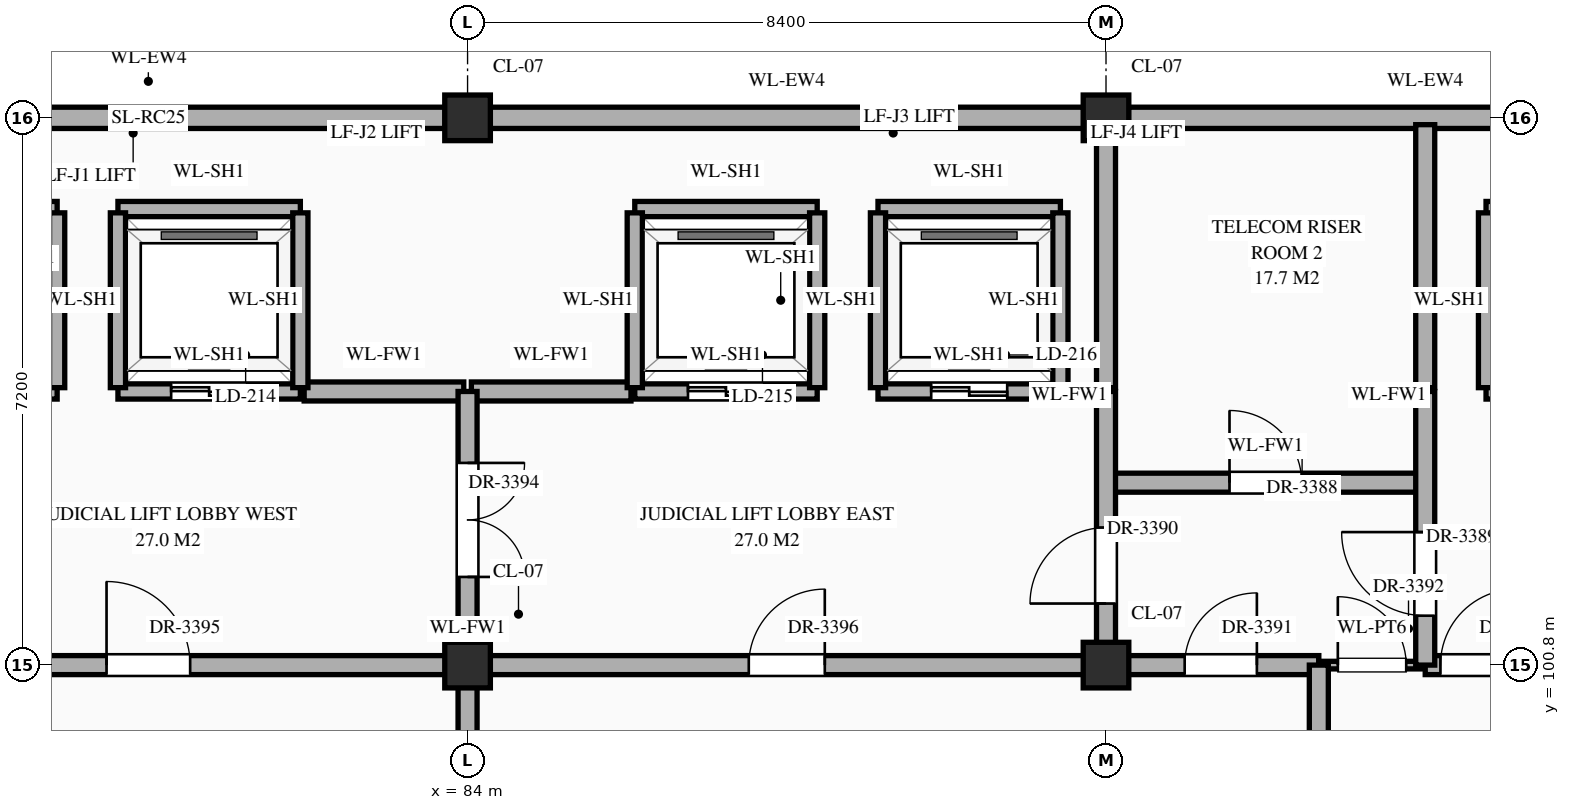
"""IFC4 building model, lengths in metres.
Left out: names, types, materials, properties, quantities, classifications, styles, units other than length and angle.
Written with IfcOpenShell. Run it as: python <this file> out.ifc"""

import sys

from ifc_helpers import new_model, si_unit, direction, frame, frame_2d, origin, origin_2d, place, context, subcontext, project, spatial, rectangle, extrude, element, fill, save


model = new_model("IFC4")
c1 = context("Model", 3, precision=1e-05, world=origin(), true_north=direction((0.0, 1.0)))
c2 = subcontext(c1, "Body", "Model", "MODEL_VIEW")
j1 = project(units=[si_unit("LENGTHUNIT", "METRE"), si_unit("PLANEANGLEUNIT", "RADIAN")], contexts=[c1])
p1 = place(None, origin())
s1 = spatial("IfcSite", under=j1, at=p1, CompositionType="ELEMENT")
p2 = place(p1, origin())
s2 = spatial("IfcBuilding", under=s1, at=p2, CompositionType="ELEMENT")
p3 = place(p2, frame((0.0, 0.0, 68.7)))
s3 = spatial("IfcBuildingStorey", under=s2, at=p3, CompositionType="ELEMENT", Elevation=68.7)
for number, where, z_axis, x_axis in (
    (1, (84.0, 100.8, 0.0), (0.0, 0.0, 1.0), (1.0, 0.0, 0.0)),
    (2, (84.0, 108.0, 0.0), (0.0, 0.0, 1.0), (1.0, 0.0, 0.0)),
    (3, (92.4, 100.8, 0.0), (0.0, 0.0, 1.0), (1.0, 0.0, 0.0)),
    (4, (92.4, 108.0, 0.0), (0.0, 0.0, 1.0), (1.0, 0.0, 0.0)),
):
    element("IfcColumn", number, at=place(p3, frame(where, z_axis=z_axis, x_axis=x_axis)), inside=s3, PredefinedType="COLUMN", context=c2, shape_type="SweptSolid", body=[
        extrude(rectangle(XDim=0.6, YDim=0.6, at=origin_2d()), origin(), (0.0, 0.0, 1.0), 4.5),
    ])
for number, where, z_axis, x_axis in (
    (5, (75.895, 108.0, 0.0), (0.0, 0.0, 1.0), (1.0, 0.0, 0.0)),
    (6, (84.295, 108.0, 0.0), (0.0, 0.0, 1.0), (1.0, 0.0, 0.0)),
):
    element("IfcWall", number, at=place(p3, frame(where, z_axis=z_axis, x_axis=x_axis)), inside=s3, PredefinedType="STANDARD", context=c2, shape_type="SweptSolid", body=[
        extrude(rectangle(XDim=7.81, YDim=0.28, at=frame_2d((3.905, 0.0))), origin(), (0.0, 0.0, 1.0), 3.47),
    ])
p4 = place(p3, frame((92.695, 108.0, 0.0), z_axis=(0.0, 0.0, 1.0), x_axis=(1.0, 0.0, 0.0)))
e7 = element("IfcWall", 7, at=p4, inside=s3, PredefinedType="STANDARD", context=c2, shape_type="SweptSolid", body=[
    extrude(rectangle(XDim=7.81, YDim=0.28, at=frame_2d((3.905, 0.0))), origin(), (0.0, 0.0, 1.0), 3.47),
])
p5 = place(p3, frame((72.8, 100.8, 0.0), z_axis=(0.0, 0.0, 1.0), x_axis=(1.0, 0.0, 0.0)))
e8 = element("IfcWall", 8, at=p5, inside=s3, PredefinedType="STANDARD", context=c2, shape_type="SweptSolid", body=[
    extrude(rectangle(XDim=22.4, YDim=0.25, at=frame_2d((11.2, 0.0))), origin(), (0.0, 0.0, 1.0), 3.27),
])
p6 = place(p5, frame((0.79, 0.0, 0.0)))
e9 = element("IfcOpeningElement", 9, at=p6, cuts=e8, PredefinedType="OPENING", context=c2, shape_type="SweptSolid", body=[
    extrude(rectangle(XDim=1.0, YDim=2.2, at=frame_2d((0.5, 1.1))), frame((0.0, 0.137, 0.0), z_axis=(0.0, -1.0, 0.0), x_axis=(1.0, 0.0, 0.0)), (0.0, 0.0, 1.0), 0.274),
])
p7 = place(p5, frame((20.635, 0.0, 0.0)))
e10 = element("IfcOpeningElement", 10, at=p7, cuts=e8, PredefinedType="OPENING", context=c2, shape_type="SweptSolid", body=[
    extrude(rectangle(XDim=0.95, YDim=2.15, at=frame_2d((0.475, 1.075))), frame((0.0, 0.137, 0.0), z_axis=(0.0, -1.0, 0.0), x_axis=(1.0, 0.0, 0.0)), (0.0, 0.0, 1.0), 0.274),
])
p8 = place(p5, frame((6.45, 0.0, 0.0)))
e11 = element("IfcOpeningElement", 11, at=p8, cuts=e8, PredefinedType="OPENING", context=c2, shape_type="SweptSolid", body=[
    extrude(rectangle(XDim=1.1, YDim=2.2, at=frame_2d((0.55, 1.1))), frame((0.0, 0.137, 0.0), z_axis=(0.0, -1.0, 0.0), x_axis=(1.0, 0.0, 0.0)), (0.0, 0.0, 1.0), 0.274),
])
p9 = place(p5, frame((14.9, 0.0, 0.0)))
e12 = element("IfcOpeningElement", 12, at=p9, cuts=e8, PredefinedType="OPENING", context=c2, shape_type="SweptSolid", body=[
    extrude(rectangle(XDim=1.0, YDim=2.2, at=frame_2d((0.5, 1.1))), frame((0.0, 0.137, 0.0), z_axis=(0.0, -1.0, 0.0), x_axis=(1.0, 0.0, 0.0)), (0.0, 0.0, 1.0), 0.274),
])
p10 = place(p3, frame((95.2, 100.8, 0.0), z_axis=(0.0, 0.0, 1.0), x_axis=(1.0, 0.0, 0.0)))
e13 = element("IfcWall", 13, at=p10, inside=s3, PredefinedType="STANDARD", context=c2, shape_type="SweptSolid", body=[
    extrude(rectangle(XDim=1.4, YDim=0.1, at=frame_2d((0.7, 0.0))), origin(), (0.0, 0.0, 1.0), 3.27),
])
p11 = place(p10, frame((0.25, 0.0, 0.0)))
e14 = element("IfcOpeningElement", 14, at=p11, cuts=e13, PredefinedType="OPENING", context=c2, shape_type="SweptSolid", body=[
    extrude(rectangle(XDim=0.9, YDim=2.15, at=frame_2d((0.45, 1.075))), frame((0.0, 0.062, 0.0), z_axis=(0.0, -1.0, 0.0), x_axis=(1.0, 0.0, 0.0)), (0.0, 0.0, 1.0), 0.124),
])
p12 = place(p3, frame((96.6, 100.8, 0.0), z_axis=(0.0, 0.0, 1.0), x_axis=(1.0, 0.0, 0.0)))
e15 = element("IfcWall", 15, at=p12, inside=s3, PredefinedType="STANDARD", context=c2, shape_type="SweptSolid", body=[
    extrude(rectangle(XDim=12.56, YDim=0.25, at=frame_2d((6.28, 0.0))), origin(), (0.0, 0.0, 1.0), 3.27),
])
p13 = place(p12, frame((7.85, 0.0, 0.0)))
e16 = element("IfcOpeningElement", 16, at=p13, cuts=e15, PredefinedType="OPENING", context=c2, shape_type="SweptSolid", body=[
    extrude(rectangle(XDim=1.1, YDim=2.2, at=frame_2d((0.55, 1.1))), frame((0.0, 0.137, 0.0), z_axis=(0.0, -1.0, 0.0), x_axis=(1.0, 0.0, 0.0)), (0.0, 0.0, 1.0), 0.274),
])
p14 = place(p12, frame((0.2, 0.0, 0.0)))
e17 = element("IfcOpeningElement", 17, at=p14, cuts=e15, PredefinedType="OPENING", context=c2, shape_type="SweptSolid", body=[
    extrude(rectangle(XDim=1.0, YDim=2.2, at=frame_2d((0.5, 1.1))), frame((0.0, 0.137, 0.0), z_axis=(0.0, -1.0, 0.0), x_axis=(1.0, 0.0, 0.0)), (0.0, 0.0, 1.0), 0.274),
])
p15 = place(p3, frame((92.4, 103.2, 0.0), z_axis=(0.0, 0.0, 1.0), x_axis=(1.0, 0.0, 0.0)))
e18 = element("IfcWall", 18, at=p15, inside=s3, PredefinedType="STANDARD", context=c2, shape_type="SweptSolid", body=[
    extrude(rectangle(XDim=4.2, YDim=0.25, at=frame_2d((2.1, 0.0))), origin(), (0.0, 0.0, 1.0), 4.12),
])
p16 = place(p15, frame((1.625, 0.0, 0.0)))
e19 = element("IfcOpeningElement", 19, at=p16, cuts=e18, PredefinedType="OPENING", context=c2, shape_type="SweptSolid", body=[
    extrude(rectangle(XDim=0.95, YDim=2.15, at=frame_2d((0.475, 1.075))), frame((0.0, 0.137, 0.0), z_axis=(0.0, -1.0, 0.0), x_axis=(1.0, 0.0, 0.0)), (0.0, 0.0, 1.0), 0.274),
])
p17 = place(p3, frame((76.2, 104.4, 0.0), z_axis=(0.0, 0.0, 1.0), x_axis=(1.0, 0.0, 0.0)))
e20 = element("IfcWall", 20, at=p17, inside=s3, PredefinedType="STANDARD", context=c2, shape_type="SweptSolid", body=[
    extrude(rectangle(XDim=2.4, YDim=0.2, at=frame_2d((1.2, 0.0))), origin(), (0.0, 0.0, 1.0), 4.12),
])
p18 = place(p17, frame((0.7, 0.0, 0.0)))
e21 = element("IfcOpeningElement", 21, at=p18, cuts=e20, PredefinedType="OPENING", context=c2, shape_type="SweptSolid", body=[
    extrude(rectangle(XDim=1.0, YDim=2.15, at=frame_2d((0.5, 1.075))), frame((0.0, 0.112, 0.0), z_axis=(0.0, -1.0, 0.0), x_axis=(1.0, 0.0, 0.0)), (0.0, 0.0, 1.0), 0.224),
])
p19 = place(p3, frame((79.4, 104.4, 0.0), z_axis=(0.0, 0.0, 1.0), x_axis=(1.0, 0.0, 0.0)))
e22 = element("IfcWall", 22, at=p19, inside=s3, PredefinedType="STANDARD", context=c2, shape_type="SweptSolid", body=[
    extrude(rectangle(XDim=2.4, YDim=0.2, at=frame_2d((1.2, 0.0))), origin(), (0.0, 0.0, 1.0), 4.12),
])
p20 = place(p19, frame((0.7, 0.0, 0.0)))
e23 = element("IfcOpeningElement", 23, at=p20, cuts=e22, PredefinedType="OPENING", context=c2, shape_type="SweptSolid", body=[
    extrude(rectangle(XDim=1.0, YDim=2.15, at=frame_2d((0.5, 1.075))), frame((0.0, 0.112, 0.0), z_axis=(0.0, -1.0, 0.0), x_axis=(1.0, 0.0, 0.0)), (0.0, 0.0, 1.0), 0.224),
])
for number, where, z_axis, x_axis in (
    (24, (81.85, 104.4, 0.0), (0.0, 0.0, 1.0), (1.0, 0.0, 0.0)),
    (25, (84.05, 104.4, 0.0), (0.0, 0.0, 1.0), (1.0, 0.0, 0.0)),
):
    element("IfcWall", number, at=place(p3, frame(where, z_axis=z_axis, x_axis=x_axis)), inside=s3, PredefinedType="STANDARD", context=c2, shape_type="SweptSolid", body=[
        extrude(rectangle(XDim=2.1, YDim=0.25, at=frame_2d((1.05, 0.0))), origin(), (0.0, 0.0, 1.0), 4.12),
    ])
p21 = place(p3, frame((86.2, 104.4, 0.0), z_axis=(0.0, 0.0, 1.0), x_axis=(1.0, 0.0, 0.0)))
e26 = element("IfcWall", 26, at=p21, inside=s3, PredefinedType="STANDARD", context=c2, shape_type="SweptSolid", body=[
    extrude(rectangle(XDim=2.4, YDim=0.2, at=frame_2d((1.2, 0.0))), origin(), (0.0, 0.0, 1.0), 4.12),
])
p22 = place(p21, frame((0.7, 0.0, 0.0)))
e27 = element("IfcOpeningElement", 27, at=p22, cuts=e26, PredefinedType="OPENING", context=c2, shape_type="SweptSolid", body=[
    extrude(rectangle(XDim=1.0, YDim=2.15, at=frame_2d((0.5, 1.075))), frame((0.0, 0.112, 0.0), z_axis=(0.0, -1.0, 0.0), x_axis=(1.0, 0.0, 0.0)), (0.0, 0.0, 1.0), 0.224),
])
p23 = place(p3, frame((89.4, 104.4, 0.0), z_axis=(0.0, 0.0, 1.0), x_axis=(1.0, 0.0, 0.0)))
e28 = element("IfcWall", 28, at=p23, inside=s3, PredefinedType="STANDARD", context=c2, shape_type="SweptSolid", body=[
    extrude(rectangle(XDim=2.4, YDim=0.2, at=frame_2d((1.2, 0.0))), origin(), (0.0, 0.0, 1.0), 4.12),
])
p24 = place(p23, frame((0.7, 0.0, 0.0)))
e29 = element("IfcOpeningElement", 29, at=p24, cuts=e28, PredefinedType="OPENING", context=c2, shape_type="SweptSolid", body=[
    extrude(rectangle(XDim=1.0, YDim=2.15, at=frame_2d((0.5, 1.075))), frame((0.0, 0.112, 0.0), z_axis=(0.0, -1.0, 0.0), x_axis=(1.0, 0.0, 0.0)), (0.0, 0.0, 1.0), 0.224),
])
p25 = place(p3, frame((97.4, 104.4, 0.0), z_axis=(0.0, 0.0, 1.0), x_axis=(1.0, 0.0, 0.0)))
e30 = element("IfcWall", 30, at=p25, inside=s3, PredefinedType="STANDARD", context=c2, shape_type="SweptSolid", body=[
    extrude(rectangle(XDim=3.0, YDim=0.2, at=frame_2d((1.5, 0.0))), origin(), (0.0, 0.0, 1.0), 4.12),
])
p26 = place(p25, frame((0.9, 0.0, 0.0)))
e31 = element("IfcOpeningElement", 31, at=p26, cuts=e30, PredefinedType="OPENING", context=c2, shape_type="SweptSolid", body=[
    extrude(rectangle(XDim=1.2, YDim=2.15, at=frame_2d((0.6, 1.075))), frame((0.0, 0.112, 0.0), z_axis=(0.0, -1.0, 0.0), x_axis=(1.0, 0.0, 0.0)), (0.0, 0.0, 1.0), 0.224),
])
for number, where, z_axis, x_axis in (
    (32, (76.2, 106.8, 0.0), (0.0, 0.0, 1.0), (1.0, 0.0, 0.0)),
    (33, (79.4, 106.8, 0.0), (0.0, 0.0, 1.0), (1.0, 0.0, 0.0)),
    (34, (86.2, 106.8, 0.0), (0.0, 0.0, 1.0), (1.0, 0.0, 0.0)),
    (35, (89.4, 106.8, 0.0), (0.0, 0.0, 1.0), (1.0, 0.0, 0.0)),
):
    element("IfcWall", number, at=place(p3, frame(where, z_axis=z_axis, x_axis=x_axis)), inside=s3, PredefinedType="STANDARD", context=c2, shape_type="SweptSolid", body=[
        extrude(rectangle(XDim=2.4, YDim=0.2, at=frame_2d((1.2, 0.0))), origin(), (0.0, 0.0, 1.0), 4.12),
    ])
p27 = place(p3, frame((97.4, 106.8, 0.0), z_axis=(0.0, 0.0, 1.0), x_axis=(1.0, 0.0, 0.0)))
e36 = element("IfcWall", 36, at=p27, inside=s3, PredefinedType="STANDARD", context=c2, shape_type="SweptSolid", body=[
    extrude(rectangle(XDim=3.0, YDim=0.2, at=frame_2d((1.5, 0.0))), origin(), (0.0, 0.0, 1.0), 4.12),
])
for number, where, z_axis, x_axis in (
    (37, (78.6, 104.45, 0.0), (0.0, 0.0, 1.0), (0.0, 1.0, 0.0)),
    (38, (79.4, 104.45, 0.0), (0.0, 0.0, 1.0), (0.0, 1.0, 0.0)),
    (39, (81.8, 104.45, 0.0), (0.0, 0.0, 1.0), (0.0, 1.0, 0.0)),
):
    element("IfcWall", number, at=place(p3, frame(where, z_axis=z_axis, x_axis=x_axis)), inside=s3, PredefinedType="STANDARD", context=c2, shape_type="SweptSolid", body=[
        extrude(rectangle(XDim=2.3, YDim=0.2, at=frame_2d((1.15, 0.0))), origin(), (0.0, 0.0, 1.0), 4.12),
    ])
p28 = place(p3, frame((84.0, 86.44, 0.0), z_axis=(0.0, 0.0, 1.0), x_axis=(0.0, 1.0, 0.0)))
e40 = element("IfcWall", 40, at=p28, inside=s3, PredefinedType="STANDARD", context=c2, shape_type="SweptSolid", body=[
    extrude(rectangle(XDim=17.96, YDim=0.25, at=frame_2d((8.98, 0.0))), origin(), (0.0, 0.0, 1.0), 3.37),
])
p29 = place(p28, frame((15.52, 0.0, 0.0)))
e41 = element("IfcOpeningElement", 41, at=p29, cuts=e40, PredefinedType="OPENING", context=c2, shape_type="SweptSolid", body=[
    extrude(rectangle(XDim=1.5, YDim=2.25, at=frame_2d((0.75, 1.125))), frame((0.0, 0.137, 0.0), z_axis=(0.0, -1.0, 0.0), x_axis=(1.0, 0.0, 0.0)), (0.0, 0.0, 1.0), 0.274),
])
p30 = place(p28, frame((5.35, 0.0, 0.0)))
e42 = element("IfcOpeningElement", 42, at=p30, cuts=e40, PredefinedType="OPENING", context=c2, shape_type="SweptSolid", body=[
    extrude(rectangle(XDim=1.0, YDim=2.2, at=frame_2d((0.5, 1.1))), frame((0.0, 0.137, 0.0), z_axis=(0.0, -1.0, 0.0), x_axis=(1.0, 0.0, 0.0)), (0.0, 0.0, 1.0), 0.274),
])
p31 = place(p28, frame((7.995, 0.0, 0.0)))
e43 = element("IfcOpeningElement", 43, at=p31, cuts=e40, PredefinedType="OPENING", context=c2, shape_type="SweptSolid", body=[
    extrude(rectangle(XDim=0.95, YDim=2.15, at=frame_2d((0.475, 1.075))), frame((0.0, 0.137, 0.0), z_axis=(0.0, -1.0, 0.0), x_axis=(1.0, 0.0, 0.0)), (0.0, 0.0, 1.0), 0.274),
])
for number, where, z_axis, x_axis in (
    (44, (86.2, 104.45, 0.0), (0.0, 0.0, 1.0), (0.0, 1.0, 0.0)),
    (45, (88.6, 104.45, 0.0), (0.0, 0.0, 1.0), (0.0, 1.0, 0.0)),
    (46, (89.4, 104.45, 0.0), (0.0, 0.0, 1.0), (0.0, 1.0, 0.0)),
    (47, (91.8, 104.45, 0.0), (0.0, 0.0, 1.0), (0.0, 1.0, 0.0)),
):
    element("IfcWall", number, at=place(p3, frame(where, z_axis=z_axis, x_axis=x_axis)), inside=s3, PredefinedType="STANDARD", context=c2, shape_type="SweptSolid", body=[
        extrude(rectangle(XDim=2.3, YDim=0.2, at=frame_2d((1.15, 0.0))), origin(), (0.0, 0.0, 1.0), 4.12),
    ])
p32 = place(p3, frame((92.4, 100.8, 0.0), z_axis=(0.0, 0.0, 1.0), x_axis=(0.0, 1.0, 0.0)))
e48 = element("IfcWall", 48, at=p32, inside=s3, PredefinedType="STANDARD", context=c2, shape_type="SweptSolid", body=[
    extrude(rectangle(XDim=3.6, YDim=0.25, at=frame_2d((1.8, 0.0))), origin(), (0.0, 0.0, 1.0), 3.37),
])
p33 = place(p32, frame((0.81, 0.0, 0.0)))
e49 = element("IfcOpeningElement", 49, at=p33, cuts=e48, PredefinedType="OPENING", context=c2, shape_type="SweptSolid", body=[
    extrude(rectangle(XDim=1.0, YDim=2.2, at=frame_2d((0.5, 1.1))), frame((0.0, 0.137, 0.0), z_axis=(0.0, -1.0, 0.0), x_axis=(1.0, 0.0, 0.0)), (0.0, 0.0, 1.0), 0.274),
])
p34 = place(p3, frame((92.4, 104.45, 0.0), z_axis=(0.0, 0.0, 1.0), x_axis=(0.0, 1.0, 0.0)))
e50 = element("IfcWall", 50, at=p34, inside=s3, PredefinedType="STANDARD", context=c2, shape_type="SweptSolid", body=[
    extrude(rectangle(XDim=3.46, YDim=0.25, at=frame_2d((1.73, 0.0))), origin(), (0.0, 0.0, 1.0), 3.37),
])
p35 = place(p3, frame((95.2, 96.0, 0.0), z_axis=(0.0, 0.0, 1.0), x_axis=(0.0, 1.0, 0.0)))
e51 = element("IfcWall", 51, at=p35, inside=s3, PredefinedType="STANDARD", context=c2, shape_type="SweptSolid", body=[
    extrude(rectangle(XDim=4.8, YDim=0.25, at=frame_2d((2.4, 0.0))), origin(), (0.0, 0.0, 1.0), 4.12),
])
p36 = place(p35, frame((1.925, 0.0, 0.0)))
e52 = element("IfcOpeningElement", 52, at=p36, cuts=e51, PredefinedType="OPENING", context=c2, shape_type="SweptSolid", body=[
    extrude(rectangle(XDim=0.95, YDim=2.15, at=frame_2d((0.475, 1.075))), frame((0.0, 0.137, 0.0), z_axis=(0.0, -1.0, 0.0), x_axis=(1.0, 0.0, 0.0)), (0.0, 0.0, 1.0), 0.274),
])
p37 = place(p3, frame((96.6, 100.8, 0.0), z_axis=(0.0, 0.0, 1.0), x_axis=(0.0, 1.0, 0.0)))
e53 = element("IfcWall", 53, at=p37, inside=s3, PredefinedType="STANDARD", context=c2, shape_type="SweptSolid", body=[
    extrude(rectangle(XDim=3.6, YDim=0.25, at=frame_2d((1.8, 0.0))), origin(), (0.0, 0.0, 1.0), 4.12),
])
p38 = place(p37, frame((0.65, 0.0, 0.0)))
e54 = element("IfcOpeningElement", 54, at=p38, cuts=e53, PredefinedType="OPENING", context=c2, shape_type="SweptSolid", body=[
    extrude(rectangle(XDim=1.1, YDim=2.2, at=frame_2d((0.55, 1.1))), frame((0.0, 0.137, 0.0), z_axis=(0.0, -1.0, 0.0), x_axis=(1.0, 0.0, 0.0)), (0.0, 0.0, 1.0), 0.274),
])
p39 = place(p3, frame((96.6, 104.45, 0.0), z_axis=(0.0, 0.0, 1.0), x_axis=(0.0, 1.0, 0.0)))
e55 = element("IfcWall", 55, at=p39, inside=s3, PredefinedType="STANDARD", context=c2, shape_type="SweptSolid", body=[
    extrude(rectangle(XDim=3.46, YDim=0.25, at=frame_2d((1.73, 0.0))), origin(), (0.0, 0.0, 1.0), 4.12),
])
p40 = place(p3, frame((97.4, 104.45, 0.0), z_axis=(0.0, 0.0, 1.0), x_axis=(0.0, 1.0, 0.0)))
e56 = element("IfcWall", 56, at=p40, inside=s3, PredefinedType="STANDARD", context=c2, shape_type="SweptSolid", body=[
    extrude(rectangle(XDim=2.3, YDim=0.2, at=frame_2d((1.15, 0.0))), origin(), (0.0, 0.0, 1.0), 4.12),
])
p41 = place(p20, origin())
e57 = element("IfcDoor", 57, at=p41, inside=s3, OperationType="DOUBLE_DOOR_SLIDING", PredefinedType="DOOR", context=c2, shape_type="SweptSolid", body=[
    extrude(rectangle(XDim=1.0, YDim=2.15, at=frame_2d((0.5, 1.075))), frame((0.0, 0.025, 0.0), z_axis=(0.0, -1.0, 0.0), x_axis=(1.0, 0.0, 0.0)), (0.0, 0.0, 1.0), 0.05),
])
fill(e23, e57)
p42 = place(p22, origin())
e58 = element("IfcDoor", 58, at=p42, inside=s3, OperationType="DOUBLE_DOOR_SLIDING", PredefinedType="DOOR", context=c2, shape_type="SweptSolid", body=[
    extrude(rectangle(XDim=1.0, YDim=2.15, at=frame_2d((0.5, 1.075))), frame((0.0, 0.025, 0.0), z_axis=(0.0, -1.0, 0.0), x_axis=(1.0, 0.0, 0.0)), (0.0, 0.0, 1.0), 0.05),
])
fill(e27, e58)
p43 = place(p24, origin())
e59 = element("IfcDoor", 59, at=p43, inside=s3, OperationType="DOUBLE_DOOR_SLIDING", PredefinedType="DOOR", context=c2, shape_type="SweptSolid", body=[
    extrude(rectangle(XDim=1.0, YDim=2.15, at=frame_2d((0.5, 1.075))), frame((0.0, 0.025, 0.0), z_axis=(0.0, -1.0, 0.0), x_axis=(1.0, 0.0, 0.0)), (0.0, 0.0, 1.0), 0.05),
])
fill(e29, e59)
p44 = place(p16, origin())
e60 = element("IfcDoor", 60, at=p44, inside=s3, OperationType="SINGLE_SWING_LEFT", PredefinedType="DOOR", context=c2, shape_type="SweptSolid", body=[
    extrude(rectangle(XDim=0.95, YDim=2.15, at=frame_2d((0.475, 1.075))), frame((0.0, 0.025, 0.0), z_axis=(0.0, -1.0, 0.0), x_axis=(1.0, 0.0, 0.0)), (0.0, 0.0, 1.0), 0.05),
])
fill(e19, e60)
p45 = place(p38, origin())
e61 = element("IfcDoor", 61, at=p45, inside=s3, OperationType="SINGLE_SWING_RIGHT", PredefinedType="DOOR", context=c2, shape_type="SweptSolid", body=[
    extrude(rectangle(XDim=1.1, YDim=2.2, at=frame_2d((0.55, 1.1))), frame((0.0, 0.025, 0.0), z_axis=(0.0, -1.0, 0.0), x_axis=(1.0, 0.0, 0.0)), (0.0, 0.0, 1.0), 0.05),
])
fill(e54, e61)
p46 = place(p33, origin())
e62 = element("IfcDoor", 62, at=p46, inside=s3, OperationType="SINGLE_SWING_LEFT", PredefinedType="DOOR", context=c2, shape_type="SweptSolid", body=[
    extrude(rectangle(XDim=1.0, YDim=2.2, at=frame_2d((0.5, 1.1))), frame((0.0, 0.025, 0.0), z_axis=(0.0, -1.0, 0.0), x_axis=(1.0, 0.0, 0.0)), (0.0, 0.0, 1.0), 0.05),
])
fill(e49, e62)
p47 = place(p7, origin())
e63 = element("IfcDoor", 63, at=p47, inside=s3, OperationType="SINGLE_SWING_RIGHT", PredefinedType="DOOR", context=c2, shape_type="SweptSolid", body=[
    extrude(rectangle(XDim=0.95, YDim=2.15, at=frame_2d((0.475, 1.075))), frame((0.0, 0.025, 0.0), z_axis=(0.0, -1.0, 0.0), x_axis=(1.0, 0.0, 0.0)), (0.0, 0.0, 1.0), 0.05),
])
fill(e10, e63)
p48 = place(p11, origin())
e64 = element("IfcDoor", 64, at=p48, inside=s3, OperationType="SINGLE_SWING_LEFT", PredefinedType="DOOR", context=c2, shape_type="SweptSolid", body=[
    extrude(rectangle(XDim=0.9, YDim=2.15, at=frame_2d((0.45, 1.075))), frame((0.0, 0.025, 0.0), z_axis=(0.0, -1.0, 0.0), x_axis=(1.0, 0.0, 0.0)), (0.0, 0.0, 1.0), 0.05),
])
fill(e14, e64)
p49 = place(p14, origin())
e65 = element("IfcDoor", 65, at=p49, inside=s3, OperationType="SINGLE_SWING_RIGHT", PredefinedType="DOOR", context=c2, shape_type="SweptSolid", body=[
    extrude(rectangle(XDim=1.0, YDim=2.2, at=frame_2d((0.5, 1.1))), frame((0.0, 0.025, 0.0), z_axis=(0.0, -1.0, 0.0), x_axis=(1.0, 0.0, 0.0)), (0.0, 0.0, 1.0), 0.05),
])
fill(e17, e65)
p50 = place(p29, frame((1.5, 0.0, 0.0), z_axis=(0.0, 0.0, 1.0), x_axis=(-1.0, 0.0, 0.0)))
e66 = element("IfcDoor", 66, at=p50, inside=s3, OperationType="DOUBLE_DOOR_SINGLE_SWING", PredefinedType="DOOR", context=c2, shape_type="SweptSolid", body=[
    extrude(rectangle(XDim=1.5, YDim=2.25, at=frame_2d((0.75, 1.125))), frame((0.0, 0.025, 0.0), z_axis=(0.0, -1.0, 0.0), x_axis=(1.0, 0.0, 0.0)), (0.0, 0.0, 1.0), 0.05),
])
fill(e41, e66)
p51 = place(p8, origin())
e67 = element("IfcDoor", 67, at=p51, inside=s3, OperationType="SINGLE_SWING_LEFT", PredefinedType="DOOR", context=c2, shape_type="SweptSolid", body=[
    extrude(rectangle(XDim=1.1, YDim=2.2, at=frame_2d((0.55, 1.1))), frame((0.0, 0.025, 0.0), z_axis=(0.0, -1.0, 0.0), x_axis=(1.0, 0.0, 0.0)), (0.0, 0.0, 1.0), 0.05),
])
fill(e11, e67)
p52 = place(p9, origin())
e68 = element("IfcDoor", 68, at=p52, inside=s3, OperationType="SINGLE_SWING_RIGHT", PredefinedType="DOOR", context=c2, shape_type="SweptSolid", body=[
    extrude(rectangle(XDim=1.0, YDim=2.2, at=frame_2d((0.5, 1.1))), frame((0.0, 0.025, 0.0), z_axis=(0.0, -1.0, 0.0), x_axis=(1.0, 0.0, 0.0)), (0.0, 0.0, 1.0), 0.05),
])
fill(e12, e68)
save(model, sys.argv[1])
